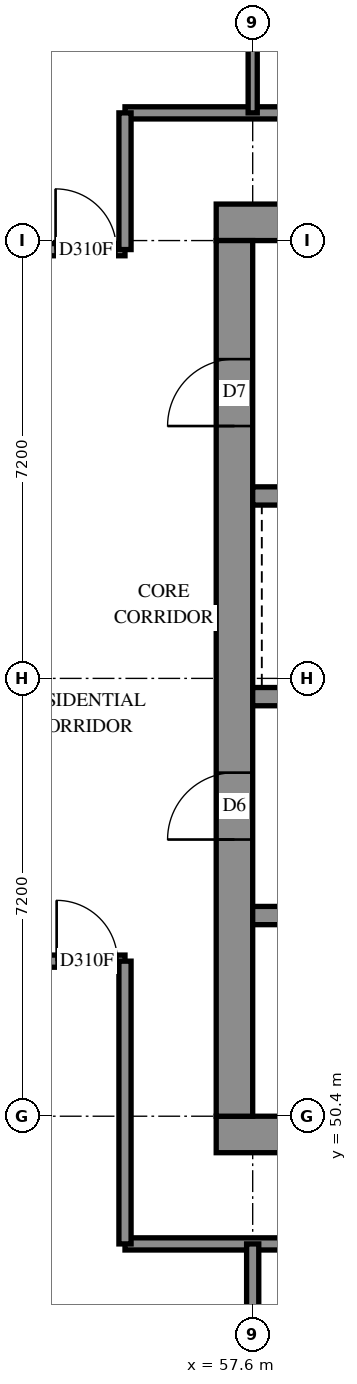
"""IFC4 building model, lengths in metres.
Left out: names, types, materials, properties, quantities, classifications, styles, units other than length and angle.
Written with IfcOpenShell. Run it as: python <this file> out.ifc"""

import sys

from ifc_helpers import new_model, si_unit, direction, frame, frame_2d, origin, place, context, subcontext, project, spatial, rectangle, extrude, element, fill, save


model = new_model("IFC4")
c1 = context("Model", 3, precision=1e-05, world=origin(), true_north=direction((0.0, 1.0)))
c2 = subcontext(c1, "Body", "Model", "MODEL_VIEW")
j1 = project(units=[si_unit("LENGTHUNIT", "METRE"), si_unit("PLANEANGLEUNIT", "RADIAN")], contexts=[c1])
p1 = place(None, origin())
s1 = spatial("IfcSite", under=j1, at=p1, CompositionType="ELEMENT")
p2 = place(p1, origin())
s2 = spatial("IfcBuilding", under=s1, at=p2, CompositionType="ELEMENT")
p3 = place(p2, frame((0.0, 0.0, 172.8)))
s3 = spatial("IfcBuildingStorey", under=s2, at=p3, CompositionType="ELEMENT", Elevation=172.8)
p4 = place(p3, frame((57.0, 50.1, -0.3), z_axis=(0.0, 0.0, 1.0), x_axis=(1.0, 0.0, 0.0)))
e1 = element("IfcWall", 1, at=p4, inside=s3, PredefinedType="SHEAR", context=c2, shape_type="SweptSolid", body=[
    extrude(rectangle(XDim=15.6, YDim=0.6, at=frame_2d((7.8, 0.0))), origin(), (0.0, 0.0, 1.0), 2.7),
])
p5 = place(p3, frame((57.0, 65.1, -0.3), z_axis=(0.0, 0.0, 1.0), x_axis=(1.0, 0.0, 0.0)))
e2 = element("IfcWall", 2, at=p5, inside=s3, PredefinedType="SHEAR", context=c2, shape_type="SweptSolid", body=[
    extrude(rectangle(XDim=15.6, YDim=0.6, at=frame_2d((7.8, 0.0))), origin(), (0.0, 0.0, 1.0), 2.7),
])
p6 = place(p5, frame((10.6, 0.0, 0.3)))
e3 = element("IfcOpeningElement", 3, at=p6, cuts=e2, PredefinedType="OPENING", context=c2, shape_type="SweptSolid", body=[
    extrude(rectangle(XDim=0.8, YDim=2.1, at=frame_2d((0.4, 1.05))), frame((0.0, 0.31, 0.0), z_axis=(0.0, -1.0, 0.0), x_axis=(1.0, 0.0, 0.0)), (0.0, 0.0, 1.0), 0.62),
])
p7 = place(p3, frame((57.3, 50.4, -0.3), z_axis=(0.0, 0.0, 1.0), x_axis=(0.0, 1.0, 0.0)))
e4 = element("IfcWall", 4, at=p7, inside=s3, PredefinedType="SHEAR", context=c2, shape_type="SweptSolid", body=[
    extrude(rectangle(XDim=14.4, YDim=0.6, at=frame_2d((7.2, 0.0))), origin(), (0.0, 0.0, 1.0), 2.7),
])
p8 = place(p7, frame((4.55, 0.0, 0.3)))
e5 = element("IfcOpeningElement", 5, at=p8, cuts=e4, PredefinedType="OPENING", context=c2, shape_type="SweptSolid", body=[
    extrude(rectangle(XDim=1.1, YDim=2.1, at=frame_2d((0.55, 1.05))), frame((0.0, 0.31, 0.0), z_axis=(0.0, -1.0, 0.0), x_axis=(1.0, 0.0, 0.0)), (0.0, 0.0, 1.0), 0.62),
])
p9 = place(p7, frame((11.35, 0.0, 0.3)))
e6 = element("IfcOpeningElement", 6, at=p9, cuts=e4, PredefinedType="OPENING", context=c2, shape_type="SweptSolid", body=[
    extrude(rectangle(XDim=1.1, YDim=2.1, at=frame_2d((0.55, 1.05))), frame((0.0, 0.31, 0.0), z_axis=(0.0, -1.0, 0.0), x_axis=(1.0, 0.0, 0.0)), (0.0, 0.0, 1.0), 0.62),
])
p10 = place(p3, frame((57.6, 53.7, 0.0), z_axis=(0.0, 0.0, 1.0), x_axis=(1.0, 0.0, 0.0)))
e7 = element("IfcWall", 7, at=p10, inside=s3, PredefinedType="SOLIDWALL", context=c2, shape_type="SweptSolid", body=[
    extrude(rectangle(XDim=14.4, YDim=0.3, at=frame_2d((7.2, 0.0))), origin(), (0.0, 0.0, 1.0), 3.1),
])
p11 = place(p10, frame((1.35, 0.0, 0.0)))
e8 = element("IfcOpeningElement", 8, at=p11, cuts=e7, PredefinedType="OPENING", context=c2, shape_type="SweptSolid", body=[
    extrude(rectangle(XDim=0.9, YDim=2.1, at=frame_2d((0.45, 1.05))), frame((0.0, 0.16, 0.0), z_axis=(0.0, -1.0, 0.0), x_axis=(1.0, 0.0, 0.0)), (0.0, 0.0, 1.0), 0.32),
])
p12 = place(p10, frame((4.95, 0.0, 0.0)))
e9 = element("IfcOpeningElement", 9, at=p12, cuts=e7, PredefinedType="OPENING", context=c2, shape_type="SweptSolid", body=[
    extrude(rectangle(XDim=0.9, YDim=2.1, at=frame_2d((0.45, 1.05))), frame((0.0, 0.16, 0.0), z_axis=(0.0, -1.0, 0.0), x_axis=(1.0, 0.0, 0.0)), (0.0, 0.0, 1.0), 0.32),
])
p13 = place(p10, frame((8.55, 0.0, 0.0)))
e10 = element("IfcOpeningElement", 10, at=p13, cuts=e7, PredefinedType="OPENING", context=c2, shape_type="SweptSolid", body=[
    extrude(rectangle(XDim=0.9, YDim=2.1, at=frame_2d((0.45, 1.05))), frame((0.0, 0.16, 0.0), z_axis=(0.0, -1.0, 0.0), x_axis=(1.0, 0.0, 0.0)), (0.0, 0.0, 1.0), 0.32),
])
p14 = place(p10, frame((12.05, 0.0, 0.0)))
e11 = element("IfcOpeningElement", 11, at=p14, cuts=e7, PredefinedType="OPENING", context=c2, shape_type="SweptSolid", body=[
    extrude(rectangle(XDim=1.1, YDim=2.1, at=frame_2d((0.55, 1.05))), frame((0.0, 0.16, 0.0), z_axis=(0.0, -1.0, 0.0), x_axis=(1.0, 0.0, 0.0)), (0.0, 0.0, 1.0), 0.32),
])
p15 = place(p3, frame((57.6, 57.3, 0.0), z_axis=(0.0, 0.0, 1.0), x_axis=(1.0, 0.0, 0.0)))
e12 = element("IfcWall", 12, at=p15, inside=s3, PredefinedType="SOLIDWALL", context=c2, shape_type="SweptSolid", body=[
    extrude(rectangle(XDim=14.4, YDim=0.3, at=frame_2d((7.2, 0.0))), origin(), (0.0, 0.0, 1.0), 3.1),
])
p16 = place(p15, frame((1.25, 0.0, 0.0)))
e13 = element("IfcOpeningElement", 13, at=p16, cuts=e12, PredefinedType="OPENING", context=c2, shape_type="SweptSolid", body=[
    extrude(rectangle(XDim=1.1, YDim=2.1, at=frame_2d((0.55, 1.05))), frame((0.0, 0.16, 0.0), z_axis=(0.0, -1.0, 0.0), x_axis=(1.0, 0.0, 0.0)), (0.0, 0.0, 1.0), 0.32),
])
p17 = place(p15, frame((4.85, 0.0, 0.0)))
e14 = element("IfcOpeningElement", 14, at=p17, cuts=e12, PredefinedType="OPENING", context=c2, shape_type="SweptSolid", body=[
    extrude(rectangle(XDim=1.1, YDim=2.1, at=frame_2d((0.55, 1.05))), frame((0.0, 0.16, 0.0), z_axis=(0.0, -1.0, 0.0), x_axis=(1.0, 0.0, 0.0)), (0.0, 0.0, 1.0), 0.32),
])
p18 = place(p15, frame((8.45, 0.0, 0.0)))
e15 = element("IfcOpeningElement", 15, at=p18, cuts=e12, PredefinedType="OPENING", context=c2, shape_type="SweptSolid", body=[
    extrude(rectangle(XDim=1.1, YDim=2.1, at=frame_2d((0.55, 1.05))), frame((0.0, 0.16, 0.0), z_axis=(0.0, -1.0, 0.0), x_axis=(1.0, 0.0, 0.0)), (0.0, 0.0, 1.0), 0.32),
])
p19 = place(p15, frame((12.05, 0.0, 0.0)))
e16 = element("IfcOpeningElement", 16, at=p19, cuts=e12, PredefinedType="OPENING", context=c2, shape_type="SweptSolid", body=[
    extrude(rectangle(XDim=1.1, YDim=2.1, at=frame_2d((0.55, 1.05))), frame((0.0, 0.16, 0.0), z_axis=(0.0, -1.0, 0.0), x_axis=(1.0, 0.0, 0.0)), (0.0, 0.0, 1.0), 0.32),
])
p20 = place(p3, frame((57.6, 60.6, 0.0), z_axis=(0.0, 0.0, 1.0), x_axis=(1.0, 0.0, 0.0)))
e17 = element("IfcWall", 17, at=p20, inside=s3, PredefinedType="SOLIDWALL", context=c2, shape_type="SweptSolid", body=[
    extrude(rectangle(XDim=7.2, YDim=0.3, at=frame_2d((3.6, 0.0))), origin(), (0.0, 0.0, 1.0), 3.1),
])
p21 = place(p3, frame((55.5, 48.3, 0.0), z_axis=(0.0, 0.0, 1.0), x_axis=(1.0, 0.0, 0.0)))
e18 = element("IfcWall", 18, at=p21, inside=s3, PredefinedType="PARTITIONING", context=c2, shape_type="SweptSolid", body=[
    extrude(rectangle(XDim=18.974, YDim=0.2, at=frame_2d((9.487, 0.0))), origin(), (0.0, 0.0, 1.0), 3.1),
])
p22 = place(p21, frame((5.963, 0.0, 0.0)))
e19 = element("IfcOpeningElement", 19, at=p22, cuts=e18, PredefinedType="OPENING", context=c2, shape_type="SweptSolid", body=[
    extrude(rectangle(XDim=1.0, YDim=2.1, at=frame_2d((0.5, 1.05))), frame((0.0, 0.11, 0.0), z_axis=(0.0, -1.0, 0.0), x_axis=(1.0, 0.0, 0.0)), (0.0, 0.0, 1.0), 0.22),
])
p23 = place(p21, frame((13.161, 0.0, 0.0)))
e20 = element("IfcOpeningElement", 20, at=p23, cuts=e18, PredefinedType="OPENING", context=c2, shape_type="SweptSolid", body=[
    extrude(rectangle(XDim=0.9, YDim=2.1, at=frame_2d((0.45, 1.05))), frame((0.0, 0.11, 0.0), z_axis=(0.0, -1.0, 0.0), x_axis=(1.0, 0.0, 0.0)), (0.0, 0.0, 1.0), 0.22),
])
p24 = place(p3, frame((55.5, 66.9, 0.0), z_axis=(0.0, 0.0, 1.0), x_axis=(1.0, 0.0, 0.0)))
e21 = element("IfcWall", 21, at=p24, inside=s3, PredefinedType="PARTITIONING", context=c2, shape_type="SweptSolid", body=[
    extrude(rectangle(XDim=18.6, YDim=0.2, at=frame_2d((9.3, 0.0))), origin(), (0.0, 0.0, 1.0), 3.1),
])
p25 = place(p24, frame((4.45, 0.0, 0.0)))
e22 = element("IfcOpeningElement", 22, at=p25, cuts=e21, PredefinedType="OPENING", context=c2, shape_type="SweptSolid", body=[
    extrude(rectangle(XDim=0.9, YDim=2.1, at=frame_2d((0.45, 1.05))), frame((0.0, 0.11, 0.0), z_axis=(0.0, -1.0, 0.0), x_axis=(1.0, 0.0, 0.0)), (0.0, 0.0, 1.0), 0.22),
])
p26 = place(p24, frame((6.1, 0.0, 0.0)))
e23 = element("IfcOpeningElement", 23, at=p26, cuts=e21, PredefinedType="OPENING", context=c2, shape_type="SweptSolid", body=[
    extrude(rectangle(XDim=0.9, YDim=2.1, at=frame_2d((0.45, 1.05))), frame((0.0, 0.11, 0.0), z_axis=(0.0, -1.0, 0.0), x_axis=(1.0, 0.0, 0.0)), (0.0, 0.0, 1.0), 0.22),
])
p27 = place(p24, frame((11.65, 0.0, 0.0)))
e24 = element("IfcOpeningElement", 24, at=p27, cuts=e21, PredefinedType="OPENING", context=c2, shape_type="SweptSolid", body=[
    extrude(rectangle(XDim=0.9, YDim=2.1, at=frame_2d((0.45, 1.05))), frame((0.0, 0.11, 0.0), z_axis=(0.0, -1.0, 0.0), x_axis=(1.0, 0.0, 0.0)), (0.0, 0.0, 1.0), 0.22),
])
p28 = place(p24, frame((13.3, 0.0, 0.0)))
e25 = element("IfcOpeningElement", 25, at=p28, cuts=e21, PredefinedType="OPENING", context=c2, shape_type="SweptSolid", body=[
    extrude(rectangle(XDim=0.9, YDim=2.1, at=frame_2d((0.45, 1.05))), frame((0.0, 0.11, 0.0), z_axis=(0.0, -1.0, 0.0), x_axis=(1.0, 0.0, 0.0)), (0.0, 0.0, 1.0), 0.22),
])
p29 = place(p3, frame((50.4, 52.95, 0.0), z_axis=(0.0, 0.0, 1.0), x_axis=(1.0, 0.0, 0.0)))
e26 = element("IfcWall", 26, at=p29, inside=s3, PredefinedType="PARTITIONING", context=c2, shape_type="SweptSolid", body=[
    extrude(rectangle(XDim=5.1, YDim=0.2, at=frame_2d((2.55, 0.0))), origin(), (0.0, 0.0, 1.0), 3.1),
])
p30 = place(p29, frame((0.4, 0.0, 0.0)))
e27 = element("IfcOpeningElement", 27, at=p30, cuts=e26, PredefinedType="OPENING", context=c2, shape_type="SweptSolid", body=[
    extrude(rectangle(XDim=0.9, YDim=2.1, at=frame_2d((0.45, 1.05))), frame((0.0, 0.11, 0.0), z_axis=(0.0, -1.0, 0.0), x_axis=(1.0, 0.0, 0.0)), (0.0, 0.0, 1.0), 0.22),
])
p31 = place(p29, frame((3.976, 0.0, 0.0)))
e28 = element("IfcOpeningElement", 28, at=p31, cuts=e26, PredefinedType="OPENING", context=c2, shape_type="SweptSolid", body=[
    extrude(rectangle(XDim=1.0, YDim=2.1, at=frame_2d((0.5, 1.05))), frame((0.0, 0.11, 0.0), z_axis=(0.0, -1.0, 0.0), x_axis=(1.0, 0.0, 0.0)), (0.0, 0.0, 1.0), 0.22),
])
p32 = place(p3, frame((55.5, 48.3, 0.0), z_axis=(0.0, 0.0, 1.0), x_axis=(0.0, 1.0, 0.0)))
e29 = element("IfcWall", 29, at=p32, inside=s3, PredefinedType="PARTITIONING", context=c2, shape_type="SweptSolid", body=[
    extrude(rectangle(XDim=4.65, YDim=0.2, at=frame_2d((2.325, 0.0))), origin(), (0.0, 0.0, 1.0), 3.1),
])
p33 = place(p3, frame((50.85, 64.65, 0.0), z_axis=(0.0, 0.0, 1.0), x_axis=(1.0, 0.0, 0.0)))
e30 = element("IfcWall", 30, at=p33, inside=s3, PredefinedType="PARTITIONING", context=c2, shape_type="SweptSolid", body=[
    extrude(rectangle(XDim=4.65, YDim=0.2, at=frame_2d((2.325, 0.0))), origin(), (0.0, 0.0, 1.0), 3.1),
])
p34 = place(p33, frame((3.509, 0.0, 0.0)))
e31 = element("IfcOpeningElement", 31, at=p34, cuts=e30, PredefinedType="OPENING", context=c2, shape_type="SweptSolid", body=[
    extrude(rectangle(XDim=1.0, YDim=2.1, at=frame_2d((0.5, 1.05))), frame((0.0, 0.11, 0.0), z_axis=(0.0, -1.0, 0.0), x_axis=(1.0, 0.0, 0.0)), (0.0, 0.0, 1.0), 0.22),
])
p35 = place(p3, frame((57.6, 43.65, 0.0), z_axis=(0.0, 0.0, 1.0), x_axis=(0.0, 1.0, 0.0)))
e32 = element("IfcWall", 32, at=p35, inside=s3, PredefinedType="PARTITIONING", context=c2, shape_type="SweptSolid", body=[
    extrude(rectangle(XDim=4.65, YDim=0.2, at=frame_2d((2.325, 0.0))), origin(), (0.0, 0.0, 1.0), 3.1),
])
p36 = place(p3, frame((57.6, 66.9, 0.0), z_axis=(0.0, 0.0, 1.0), x_axis=(0.0, 1.0, 0.0)))
e33 = element("IfcWall", 33, at=p36, inside=s3, PredefinedType="PARTITIONING", context=c2, shape_type="SweptSolid", body=[
    extrude(rectangle(XDim=2.4, YDim=0.15, at=frame_2d((1.2, 0.0))), origin(), (0.0, 0.0, 1.0), 3.1),
])
p37 = place(p3, frame((55.5, 64.652, 0.0), z_axis=(0.0, 0.0, 1.0), x_axis=(0.0, 1.0, 0.0)))
e34 = element("IfcWall", 34, at=p37, inside=s3, PredefinedType="PARTITIONING", context=c2, shape_type="SweptSolid", body=[
    extrude(rectangle(XDim=2.248, YDim=0.2, at=frame_2d((1.124, 0.0))), origin(), (0.0, 0.0, 1.0), 3.1),
])
p38 = place(p8, origin())
e35 = element("IfcDoor", 35, at=p38, inside=s3, OperationType="DOUBLE_DOOR_SINGLE_SWING", PredefinedType="DOOR", context=c2, shape_type="SweptSolid", body=[
    extrude(rectangle(XDim=1.1, YDim=2.1, at=frame_2d((0.55, 1.05))), frame((0.0, 0.025, 0.0), z_axis=(0.0, -1.0, 0.0), x_axis=(1.0, 0.0, 0.0)), (0.0, 0.0, 1.0), 0.05),
])
fill(e5, e35)
p39 = place(p9, origin())
e36 = element("IfcDoor", 36, at=p39, inside=s3, OperationType="SINGLE_SWING_LEFT", PredefinedType="DOOR", context=c2, shape_type="SweptSolid", body=[
    extrude(rectangle(XDim=1.1, YDim=2.1, at=frame_2d((0.55, 1.05))), frame((0.0, 0.025, 0.0), z_axis=(0.0, -1.0, 0.0), x_axis=(1.0, 0.0, 0.0)), (0.0, 0.0, 1.0), 0.05),
])
fill(e6, e36)
p40 = place(p34, origin())
e37 = element("IfcDoor", 37, at=p40, inside=s3, OperationType="SINGLE_SWING_LEFT", PredefinedType="DOOR", context=c2, shape_type="SweptSolid", body=[
    extrude(rectangle(XDim=1.0, YDim=2.1, at=frame_2d((0.5, 1.05))), frame((0.0, 0.025, 0.0), z_axis=(0.0, -1.0, 0.0), x_axis=(1.0, 0.0, 0.0)), (0.0, 0.0, 1.0), 0.05),
])
fill(e31, e37)
p41 = place(p31, origin())
e38 = element("IfcDoor", 38, at=p41, inside=s3, OperationType="SINGLE_SWING_RIGHT", PredefinedType="DOOR", context=c2, shape_type="SweptSolid", body=[
    extrude(rectangle(XDim=1.0, YDim=2.1, at=frame_2d((0.5, 1.05))), frame((0.0, 0.025, 0.0), z_axis=(0.0, -1.0, 0.0), x_axis=(1.0, 0.0, 0.0)), (0.0, 0.0, 1.0), 0.05),
])
fill(e28, e38)
save(model, sys.argv[1])
